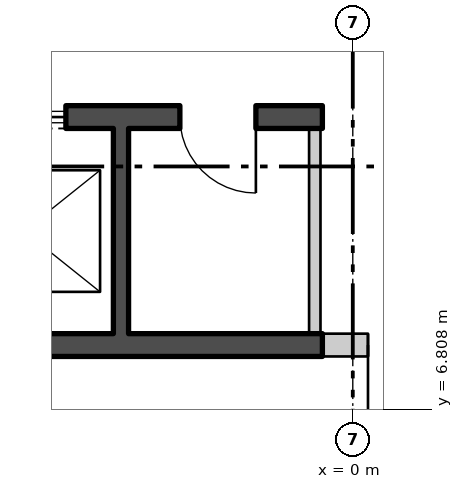
"""IFC4 building model, lengths in metres.
Left out: names, types, materials, properties, quantities, classifications, styles, units other than length and angle.
Written with IfcOpenShell. Run it as: python <this file> out.ifc"""

import sys

from ifc_helpers import new_model, si_unit, direction, frame, frame_2d, origin, place, context, subcontext, project, spatial, polyline, rectangle, outline, extrude, element, fill, save


model = new_model("IFC4")
c1 = context("Model", 3, precision=1e-05, world=origin(), true_north=direction((0.0, 1.0)))
c2 = subcontext(c1, "Body", "Model", "MODEL_VIEW")
j1 = project(units=[si_unit("LENGTHUNIT", "METRE"), si_unit("PLANEANGLEUNIT", "RADIAN")], contexts=[c1])
p1 = place(None, origin())
s1 = spatial("IfcSite", under=j1, at=p1, CompositionType="ELEMENT")
p2 = place(p1, origin())
s2 = spatial("IfcBuilding", under=s1, at=p2, CompositionType="ELEMENT")
p3 = place(p2, frame((0.0, 0.0, 227.7)))
s3 = spatial("IfcBuildingStorey", under=s2, at=p3, CompositionType="ELEMENT", Elevation=227.7)
p4 = place(p3, frame((-26.075, 14.415, -0.18), z_axis=(0.0, 0.0, 1.0), x_axis=(0.499999194392, -0.866025868902, 0.0)))
e1 = element("IfcWall", 1, at=p4, inside=s3, PredefinedType="SOLIDWALL", context=c2, shape_type="SweptSolid", body=[
    extrude(outline(polyline([(-0.13, -0.225), (45.86, -0.225), (45.6, 0.225), (0.13, 0.225), (-0.13, -0.225)])), origin(), (0.0, 0.0, 1.0), 3.68),
])
p5 = place(p4, frame((1.424, 0.0, 1.08)))
e2 = element("IfcOpeningElement", 2, at=p5, cuts=e1, PredefinedType="OPENING", context=c2, shape_type="SweptSolid", body=[
    extrude(rectangle(XDim=2.4, YDim=2.0, at=frame_2d((1.2, 1.0))), frame((0.0, 0.235, 0.0), z_axis=(0.0, -1.0, 0.0), x_axis=(1.0, 0.0, 0.0)), (0.0, 0.0, 1.0), 0.47),
])
p6 = place(p4, frame((5.892, 0.0, 1.08)))
e3 = element("IfcOpeningElement", 3, at=p6, cuts=e1, PredefinedType="OPENING", context=c2, shape_type="SweptSolid", body=[
    extrude(rectangle(XDim=2.4, YDim=2.0, at=frame_2d((1.2, 1.0))), frame((0.0, 0.235, 0.0), z_axis=(0.0, -1.0, 0.0), x_axis=(1.0, 0.0, 0.0)), (0.0, 0.0, 1.0), 0.47),
])
p7 = place(p4, frame((10.399, 0.0, 1.08)))
e4 = element("IfcOpeningElement", 4, at=p7, cuts=e1, PredefinedType="OPENING", context=c2, shape_type="SweptSolid", body=[
    extrude(rectangle(XDim=2.4, YDim=2.0, at=frame_2d((1.2, 1.0))), frame((0.0, 0.235, 0.0), z_axis=(0.0, -1.0, 0.0), x_axis=(1.0, 0.0, 0.0)), (0.0, 0.0, 1.0), 0.47),
])
p8 = place(p4, frame((19.412, 0.0, 1.08)))
e5 = element("IfcOpeningElement", 5, at=p8, cuts=e1, PredefinedType="OPENING", context=c2, shape_type="SweptSolid", body=[
    extrude(rectangle(XDim=2.4, YDim=2.0, at=frame_2d((1.2, 1.0))), frame((0.0, 0.235, 0.0), z_axis=(0.0, -1.0, 0.0), x_axis=(1.0, 0.0, 0.0)), (0.0, 0.0, 1.0), 0.47),
])
p9 = place(p4, frame((23.918, 0.0, 1.08)))
e6 = element("IfcOpeningElement", 6, at=p9, cuts=e1, PredefinedType="OPENING", context=c2, shape_type="SweptSolid", body=[
    extrude(rectangle(XDim=2.4, YDim=2.0, at=frame_2d((1.2, 1.0))), frame((0.0, 0.235, 0.0), z_axis=(0.0, -1.0, 0.0), x_axis=(1.0, 0.0, 0.0)), (0.0, 0.0, 1.0), 0.47),
])
p10 = place(p4, frame((28.425, 0.0, 1.08)))
e7 = element("IfcOpeningElement", 7, at=p10, cuts=e1, PredefinedType="OPENING", context=c2, shape_type="SweptSolid", body=[
    extrude(rectangle(XDim=2.4, YDim=2.0, at=frame_2d((1.2, 1.0))), frame((0.0, 0.235, 0.0), z_axis=(0.0, -1.0, 0.0), x_axis=(1.0, 0.0, 0.0)), (0.0, 0.0, 1.0), 0.47),
])
p11 = place(p4, frame((32.932, 0.0, 1.08)))
e8 = element("IfcOpeningElement", 8, at=p11, cuts=e1, PredefinedType="OPENING", context=c2, shape_type="SweptSolid", body=[
    extrude(rectangle(XDim=2.4, YDim=2.0, at=frame_2d((1.2, 1.0))), frame((0.0, 0.235, 0.0), z_axis=(0.0, -1.0, 0.0), x_axis=(1.0, 0.0, 0.0)), (0.0, 0.0, 1.0), 0.47),
])
p12 = place(p4, frame((41.907, 0.0, 1.08)))
e9 = element("IfcOpeningElement", 9, at=p12, cuts=e1, PredefinedType="OPENING", context=c2, shape_type="SweptSolid", body=[
    extrude(rectangle(XDim=2.4, YDim=2.0, at=frame_2d((1.2, 1.0))), frame((0.0, 0.235, 0.0), z_axis=(0.0, -1.0, 0.0), x_axis=(1.0, 0.0, 0.0)), (0.0, 0.0, 1.0), 0.47),
])
p13 = place(p3, frame((-10.7, 10.65, 0.0), z_axis=(0.0, 0.0, 1.0), x_axis=(1.0, 0.0, 0.0)))
e10 = element("IfcWall", 10, at=p13, inside=s3, PredefinedType="SHEAR", context=c2, shape_type="SweptSolid", body=[
    extrude(rectangle(XDim=10.3, YDim=0.3, at=frame_2d((5.15, 0.0))), origin(), (0.0, 0.0, 1.0), 3.7),
])
p14 = place(p13, frame((0.675, 0.0, 0.0)))
e11 = element("IfcOpeningElement", 11, at=p14, cuts=e10, PredefinedType="OPENING", context=c2, shape_type="SweptSolid", body=[
    extrude(rectangle(XDim=1.1, YDim=2.1, at=frame_2d((0.55, 1.05))), frame((0.0, 0.16, 0.0), z_axis=(0.0, -1.0, 0.0), x_axis=(1.0, 0.0, 0.0)), (0.0, 0.0, 1.0), 0.32),
])
p15 = place(p13, frame((3.275, 0.0, 0.0)))
e12 = element("IfcOpeningElement", 12, at=p15, cuts=e10, PredefinedType="OPENING", context=c2, shape_type="SweptSolid", body=[
    extrude(rectangle(XDim=1.1, YDim=2.1, at=frame_2d((0.55, 1.05))), frame((0.0, 0.16, 0.0), z_axis=(0.0, -1.0, 0.0), x_axis=(1.0, 0.0, 0.0)), (0.0, 0.0, 1.0), 0.32),
])
p16 = place(p13, frame((5.825, 0.0, 0.0)))
e13 = element("IfcOpeningElement", 13, at=p16, cuts=e10, PredefinedType="OPENING", context=c2, shape_type="SweptSolid", body=[
    extrude(rectangle(XDim=1.1, YDim=2.1, at=frame_2d((0.55, 1.05))), frame((0.0, 0.16, 0.0), z_axis=(0.0, -1.0, 0.0), x_axis=(1.0, 0.0, 0.0)), (0.0, 0.0, 1.0), 0.32),
])
p17 = place(p13, frame((8.425, 0.0, 0.0)))
e14 = element("IfcOpeningElement", 14, at=p17, cuts=e10, PredefinedType="OPENING", context=c2, shape_type="SweptSolid", body=[
    extrude(rectangle(XDim=1.0, YDim=2.1, at=frame_2d((0.5, 1.05))), frame((0.0, 0.16, 0.0), z_axis=(0.0, -1.0, 0.0), x_axis=(1.0, 0.0, 0.0)), (0.0, 0.0, 1.0), 0.32),
])
p18 = place(p3, frame((-10.7, 7.65, 0.0), z_axis=(0.0, 0.0, 1.0), x_axis=(1.0, 0.0, 0.0)))
e15 = element("IfcWall", 15, at=p18, inside=s3, PredefinedType="SHEAR", context=c2, shape_type="SweptSolid", body=[
    extrude(rectangle(XDim=10.3, YDim=0.3, at=frame_2d((5.15, 0.0))), origin(), (0.0, 0.0, 1.0), 3.7),
])
p19 = place(p3, frame((-3.05, 7.8, 0.0), z_axis=(0.0, 0.0, 1.0), x_axis=(0.0, 1.0, 0.0)))
e16 = element("IfcWall", 16, at=p19, inside=s3, PredefinedType="SHEAR", context=c2, shape_type="SweptSolid", body=[
    extrude(rectangle(XDim=2.7, YDim=0.2, at=frame_2d((1.35, 0.0))), origin(), (0.0, 0.0, 1.0), 3.7),
])
p20 = place(p3, frame((-0.5, 7.8, 0.0), z_axis=(0.0, 0.0, 1.0), x_axis=(0.0, 1.0, 0.0)))
e17 = element("IfcWall", 17, at=p20, inside=s3, PredefinedType="PARTITIONING", context=c2, shape_type="SweptSolid", body=[
    extrude(rectangle(XDim=2.7, YDim=0.15, at=frame_2d((1.35, 0.0))), origin(), (0.0, 0.0, 1.0), 3.7),
])
p21 = place(p3, frame((-0.4, 7.65, 0.0), z_axis=(0.0, 0.0, 1.0), x_axis=(1.0, 0.0, 0.0)))
e18 = element("IfcWall", 18, at=p21, inside=s3, PredefinedType="PARTITIONING", context=c2, shape_type="SweptSolid", body=[
    extrude(rectangle(XDim=3.0, YDim=0.3, at=frame_2d((1.5, 0.0))), origin(), (0.0, 0.0, 1.0), 3.7),
])
p22 = place(p21, frame((0.6, 0.0, 0.0)))
e19 = element("IfcOpeningElement", 19, at=p22, cuts=e18, PredefinedType="OPENING", context=c2, shape_type="SweptSolid", body=[
    extrude(rectangle(XDim=1.8, YDim=2.4, at=frame_2d((0.9, 1.2))), frame((0.0, 0.16, 0.0), z_axis=(0.0, -1.0, 0.0), x_axis=(1.0, 0.0, 0.0)), (0.0, 0.0, 1.0), 0.32),
])
p23 = place(p16, origin())
e20 = element("IfcDoor", 20, at=p23, inside=s3, OperationType="SLIDING_TO_LEFT", PredefinedType="DOOR", context=c2, shape_type="SweptSolid", body=[
    extrude(rectangle(XDim=1.1, YDim=2.1, at=frame_2d((0.55, 1.05))), frame((0.0, 0.025, 0.0), z_axis=(0.0, -1.0, 0.0), x_axis=(1.0, 0.0, 0.0)), (0.0, 0.0, 1.0), 0.05),
])
fill(e13, e20)
p24 = place(p17, origin())
e21 = element("IfcDoor", 21, at=p24, inside=s3, OperationType="SINGLE_SWING_RIGHT", PredefinedType="DOOR", context=c2, shape_type="SweptSolid", body=[
    extrude(rectangle(XDim=1.0, YDim=2.1, at=frame_2d((0.5, 1.05))), frame((0.0, 0.025, 0.0), z_axis=(0.0, -1.0, 0.0), x_axis=(1.0, 0.0, 0.0)), (0.0, 0.0, 1.0), 0.05),
])
fill(e14, e21)
p25 = place(p22, origin())
e22 = element("IfcDoor", 22, at=p25, inside=s3, OperationType="DOUBLE_DOOR_SINGLE_SWING", PredefinedType="DOOR", context=c2, shape_type="SweptSolid", body=[
    extrude(rectangle(XDim=1.8, YDim=2.4, at=frame_2d((0.9, 1.2))), frame((0.0, 0.025, 0.0), z_axis=(0.0, -1.0, 0.0), x_axis=(1.0, 0.0, 0.0)), (0.0, 0.0, 1.0), 0.05),
])
fill(e19, e22)
save(model, sys.argv[1])
